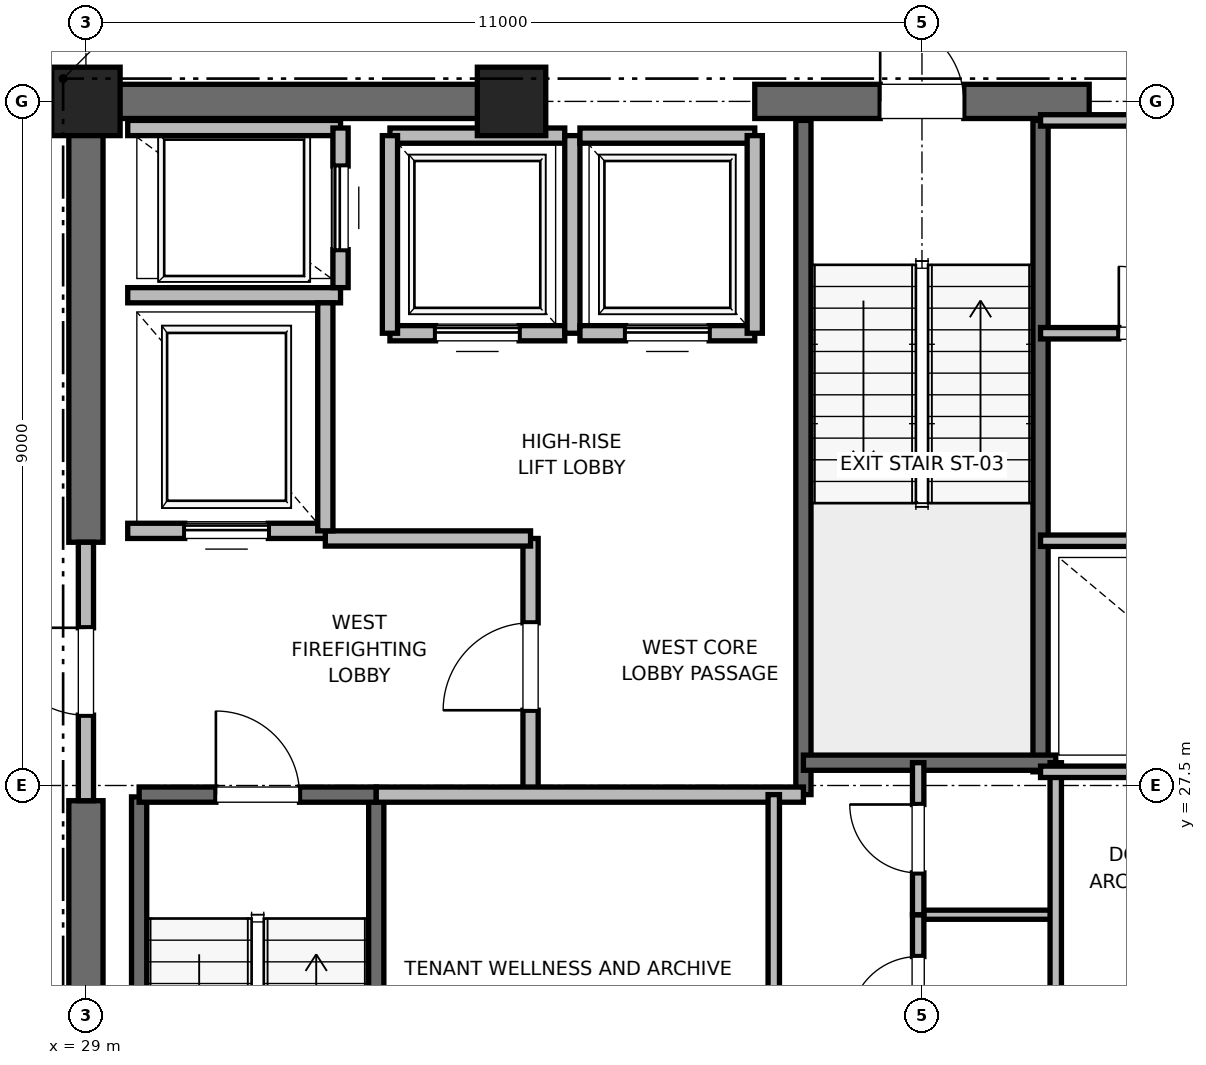
"""IFC4 building model, lengths in metres.
Left out: names, types, materials, properties, quantities, classifications, styles, units other than length and angle.
Written with IfcOpenShell. Run it as: python <this file> out.ifc"""

import sys

from ifc_helpers import new_model, si_unit, direction, frame, frame_2d, origin, origin_2d, place, context, subcontext, project, spatial, rectangle, extrude, element, fill, save


model = new_model("IFC4")
c1 = context("Model", 3, precision=1e-05, world=origin(), true_north=direction((0.0, 1.0)))
c2 = subcontext(c1, "Body", "Model", "MODEL_VIEW")
j1 = project(units=[si_unit("LENGTHUNIT", "METRE"), si_unit("PLANEANGLEUNIT", "RADIAN")], contexts=[c1])
p1 = place(None, origin())
s1 = spatial("IfcSite", under=j1, at=p1, CompositionType="ELEMENT")
p2 = place(p1, origin())
s2 = spatial("IfcBuilding", under=s1, at=p2, CompositionType="ELEMENT")
p3 = place(p2, frame((0.0, 0.0, 275.2)))
s3 = spatial("IfcBuildingStorey", under=s2, at=p3, CompositionType="ELEMENT", Elevation=275.2)
for number, where, z_axis, x_axis in (
    (1, (29.0, 36.5, 0.0), (0.0, 0.0, 1.0), (1.0, 0.0, 0.0)),
    (2, (34.6, 36.5, 0.0), (0.0, 0.0, 1.0), (1.0, 0.0, 0.0)),
):
    element("IfcColumn", number, at=place(p3, frame(where, z_axis=z_axis, x_axis=x_axis)), inside=s3, PredefinedType="PILASTER", context=c2, shape_type="SweptSolid", body=[
        extrude(rectangle(XDim=0.9, YDim=0.9, at=origin_2d()), origin(), (0.0, 0.0, 1.0), 4.0),
    ])
p4 = place(p3, frame((29.0, 36.5, 0.0), z_axis=(0.0, 0.0, 1.0), x_axis=(1.0, 0.0, 0.0)))
e3 = element("IfcWall", 3, at=p4, inside=s3, PredefinedType="SHEAR", context=c2, shape_type="SweptSolid", body=[
    extrude(rectangle(XDim=5.8, YDim=0.45, at=frame_2d((2.9, 0.0))), origin(), (0.0, 0.0, 1.0), 3.785),
])
p5 = place(p3, frame((37.8, 36.5, 0.0), z_axis=(0.0, 0.0, 1.0), x_axis=(1.0, 0.0, 0.0)))
e4 = element("IfcWall", 4, at=p5, inside=s3, PredefinedType="SHEAR", context=c2, shape_type="SweptSolid", body=[
    extrude(rectangle(XDim=4.4, YDim=0.45, at=frame_2d((2.2, 0.0))), origin(), (0.0, 0.0, 1.0), 3.785),
])
p6 = place(p5, frame((1.65, 0.0, 0.0)))
e5 = element("IfcOpeningElement", 5, at=p6, cuts=e4, PredefinedType="OPENING", context=c2, shape_type="SweptSolid", body=[
    extrude(rectangle(XDim=1.1, YDim=2.15, at=frame_2d((0.55, 1.075))), frame((0.0, 0.225, 0.0), z_axis=(0.0, -1.0, 0.0), x_axis=(1.0, 0.0, 0.0)), (0.0, 0.0, 1.0), 0.45),
])
p7 = place(p3, frame((29.0, 18.5, 0.0), z_axis=(0.0, 0.0, 1.0), x_axis=(0.0, 1.0, 0.0)))
e6 = element("IfcWall", 6, at=p7, inside=s3, PredefinedType="SHEAR", context=c2, shape_type="SweptSolid", body=[
    extrude(rectangle(XDim=8.8, YDim=0.45, at=frame_2d((4.4, 0.0))), origin(), (0.0, 0.0, 1.0), 3.785),
])
p8 = place(p3, frame((29.0, 30.7, 0.0), z_axis=(0.0, 0.0, 1.0), x_axis=(0.0, 1.0, 0.0)))
e7 = element("IfcWall", 7, at=p8, inside=s3, PredefinedType="SHEAR", context=c2, shape_type="SweptSolid", body=[
    extrude(rectangle(XDim=5.8, YDim=0.45, at=frame_2d((2.9, 0.0))), origin(), (0.0, 0.0, 1.0), 3.785),
])
p9 = place(p3, frame((29.7, 19.2, 0.0), z_axis=(0.0, 0.0, 1.0), x_axis=(0.0, 1.0, 0.0)))
e8 = element("IfcWall", 8, at=p9, inside=s3, PredefinedType="SOLIDWALL", context=c2, shape_type="SweptSolid", body=[
    extrude(rectangle(XDim=8.15, YDim=0.2, at=frame_2d((4.075, 0.0))), origin(), (0.0, 0.0, 1.0), 3.785),
])
p10 = place(p3, frame((32.82, 18.6, 0.0), z_axis=(0.0, 0.0, 1.0), x_axis=(0.0, 1.0, 0.0)))
e9 = element("IfcWall", 9, at=p10, inside=s3, PredefinedType="SOLIDWALL", context=c2, shape_type="SweptSolid", body=[
    extrude(rectangle(XDim=8.78, YDim=0.2, at=frame_2d((4.39, 0.0))), origin(), (0.0, 0.0, 1.0), 3.785),
])
p11 = place(p3, frame((29.7, 27.38, 0.0), z_axis=(0.0, 0.0, 1.0), x_axis=(1.0, 0.0, 0.0)))
e10 = element("IfcWall", 10, at=p11, inside=s3, PredefinedType="SOLIDWALL", context=c2, shape_type="SweptSolid", body=[
    extrude(rectangle(XDim=3.12, YDim=0.2, at=frame_2d((1.56, 0.0))), origin(), (0.0, 0.0, 1.0), 3.785),
])
p12 = place(p11, frame((1.01, 0.0, 0.0)))
e11 = element("IfcOpeningElement", 11, at=p12, cuts=e10, PredefinedType="OPENING", context=c2, shape_type="SweptSolid", body=[
    extrude(rectangle(XDim=1.1, YDim=2.15, at=frame_2d((0.55, 1.075))), frame((0.0, 0.1, 0.0), z_axis=(0.0, -1.0, 0.0), x_axis=(1.0, 0.0, 0.0)), (0.0, 0.0, 1.0), 0.2),
])
p13 = place(p3, frame((38.44, 27.38, 0.0), z_axis=(0.0, 0.0, 1.0), x_axis=(0.0, 1.0, 0.0)))
e12 = element("IfcWall", 12, at=p13, inside=s3, PredefinedType="SOLIDWALL", context=c2, shape_type="SweptSolid", body=[
    extrude(rectangle(XDim=8.87, YDim=0.2, at=frame_2d((4.435, 0.0))), origin(), (0.0, 0.0, 1.0), 3.785),
])
p14 = place(p3, frame((41.56, 27.68, 0.0), z_axis=(0.0, 0.0, 1.0), x_axis=(0.0, 1.0, 0.0)))
e13 = element("IfcWall", 13, at=p14, inside=s3, PredefinedType="SOLIDWALL", context=c2, shape_type="SweptSolid", body=[
    extrude(rectangle(XDim=8.57, YDim=0.2, at=frame_2d((4.285, 0.0))), origin(), (0.0, 0.0, 1.0), 3.785),
])
p15 = place(p3, frame((38.44, 27.8, 0.0), z_axis=(0.0, 0.0, 1.0), x_axis=(1.0, 0.0, 0.0)))
e14 = element("IfcWall", 14, at=p15, inside=s3, PredefinedType="SOLIDWALL", context=c2, shape_type="SweptSolid", body=[
    extrude(rectangle(XDim=3.32, YDim=0.2, at=frame_2d((1.66, 0.0))), origin(), (0.0, 0.0, 1.0), 3.785),
])
p16 = place(p3, frame((34.85, 27.38, 0.0), z_axis=(0.0, 0.0, 1.0), x_axis=(0.0, 1.0, 0.0)))
e15 = element("IfcWall", 15, at=p16, inside=s3, PredefinedType="PARTITIONING", context=c2, shape_type="SweptSolid", body=[
    extrude(rectangle(XDim=3.37, YDim=0.2, at=frame_2d((1.685, 0.0))), origin(), (0.0, 0.0, 1.0), 3.785),
])
p17 = place(p16, frame((1.11, 0.0, 0.0)))
e16 = element("IfcOpeningElement", 16, at=p17, cuts=e15, PredefinedType="OPENING", context=c2, shape_type="SweptSolid", body=[
    extrude(rectangle(XDim=1.15, YDim=2.2, at=frame_2d((0.575, 1.1))), frame((0.0, 0.1, 0.0), z_axis=(0.0, -1.0, 0.0), x_axis=(1.0, 0.0, 0.0)), (0.0, 0.0, 1.0), 0.2),
])
p18 = place(p3, frame((29.0, 27.3, 0.0), z_axis=(0.0, 0.0, 1.0), x_axis=(0.0, 1.0, 0.0)))
e17 = element("IfcWall", 17, at=p18, inside=s3, PredefinedType="PARTITIONING", context=c2, shape_type="SweptSolid", body=[
    extrude(rectangle(XDim=3.4, YDim=0.2, at=frame_2d((1.7, 0.0))), origin(), (0.0, 0.0, 1.0), 2.865),
])
p19 = place(p18, frame((1.125, 0.0, 0.0)))
e18 = element("IfcOpeningElement", 18, at=p19, cuts=e17, PredefinedType="OPENING", context=c2, shape_type="SweptSolid", body=[
    extrude(rectangle(XDim=1.15, YDim=2.2, at=frame_2d((0.575, 1.1))), frame((0.0, 0.1, 0.0), z_axis=(0.0, -1.0, 0.0), x_axis=(1.0, 0.0, 0.0)), (0.0, 0.0, 1.0), 0.2),
])
p20 = place(p3, frame((32.82, 27.38, 0.0), z_axis=(0.0, 0.0, 1.0), x_axis=(1.0, 0.0, 0.0)))
e19 = element("IfcWall", 19, at=p20, inside=s3, PredefinedType="PARTITIONING", context=c2, shape_type="SweptSolid", body=[
    extrude(rectangle(XDim=5.62, YDim=0.2, at=frame_2d((2.81, 0.0))), origin(), (0.0, 0.0, 1.0), 3.785),
])
p21 = place(p3, frame((32.15, 30.75, 0.0), z_axis=(0.0, 0.0, 1.0), x_axis=(1.0, 0.0, 0.0)))
e20 = element("IfcWall", 20, at=p21, inside=s3, PredefinedType="PARTITIONING", context=c2, shape_type="SweptSolid", body=[
    extrude(rectangle(XDim=2.7, YDim=0.2, at=frame_2d((1.35, 0.0))), origin(), (0.0, 0.0, 1.0), 3.785),
])
p22 = place(p3, frame((29.55, 30.85, 0.0), z_axis=(0.0, 0.0, 1.0), x_axis=(1.0, 0.0, 0.0)))
e21 = element("IfcWall", 21, at=p22, inside=s3, PredefinedType="SOLIDWALL", context=c2, shape_type="SweptSolid", body=[
    extrude(rectangle(XDim=2.6, YDim=0.2, at=frame_2d((1.3, 0.0))), origin(), (0.0, 0.0, 1.0), 2.865),
])
p23 = place(p22, frame((0.75, 0.0, 0.0)))
e22 = element("IfcOpeningElement", 22, at=p23, cuts=e21, PredefinedType="OPENING", context=c2, shape_type="SweptSolid", body=[
    extrude(rectangle(XDim=1.1, YDim=2.2, at=frame_2d((0.55, 1.1))), frame((0.0, 0.1, 0.0), z_axis=(0.0, -1.0, 0.0), x_axis=(1.0, 0.0, 0.0)), (0.0, 0.0, 1.0), 0.2),
])
p24 = place(p3, frame((29.55, 33.95, 0.0), z_axis=(0.0, 0.0, 1.0), x_axis=(1.0, 0.0, 0.0)))
e23 = element("IfcWall", 23, at=p24, inside=s3, PredefinedType="SOLIDWALL", context=c2, shape_type="SweptSolid", body=[
    extrude(rectangle(XDim=2.8, YDim=0.2, at=frame_2d((1.4, 0.0))), origin(), (0.0, 0.0, 1.0), 3.785),
])
p25 = place(p3, frame((32.15, 30.85, 0.0), z_axis=(0.0, 0.0, 1.0), x_axis=(0.0, 1.0, 0.0)))
e24 = element("IfcWall", 24, at=p25, inside=s3, PredefinedType="SOLIDWALL", context=c2, shape_type="SweptSolid", body=[
    extrude(rectangle(XDim=3.0, YDim=0.2, at=frame_2d((1.5, 0.0))), origin(), (0.0, 0.0, 1.0), 3.785),
])
p26 = place(p3, frame((32.35, 36.15, 0.0), z_axis=(0.0, 0.0, 1.0), x_axis=(-1.0, 0.0, 0.0)))
e25 = element("IfcWall", 25, at=p26, inside=s3, PredefinedType="SOLIDWALL", context=c2, shape_type="SweptSolid", body=[
    extrude(rectangle(XDim=2.8, YDim=0.2, at=frame_2d((1.4, 0.0))), origin(), (0.0, 0.0, 1.0), 3.148),
])
p27 = place(p3, frame((32.35, 34.05, 0.0), z_axis=(0.0, 0.0, 1.0), x_axis=(0.0, 1.0, 0.0)))
e26 = element("IfcWall", 26, at=p27, inside=s3, PredefinedType="SOLIDWALL", context=c2, shape_type="SweptSolid", body=[
    extrude(rectangle(XDim=2.1, YDim=0.2, at=frame_2d((1.05, 0.0))), origin(), (0.0, 0.0, 1.0), 3.785),
])
p28 = place(p27, frame((0.5, 0.0, 0.0)))
e27 = element("IfcOpeningElement", 27, at=p28, cuts=e26, PredefinedType="OPENING", context=c2, shape_type="SweptSolid", body=[
    extrude(rectangle(XDim=1.1, YDim=2.2, at=frame_2d((0.55, 1.1))), frame((0.0, 0.1, 0.0), z_axis=(0.0, -1.0, 0.0), x_axis=(1.0, 0.0, 0.0)), (0.0, 0.0, 1.0), 0.2),
])
p29 = place(p3, frame((33.0, 33.45, 0.0), z_axis=(0.0, 0.0, 1.0), x_axis=(1.0, 0.0, 0.0)))
e28 = element("IfcWall", 28, at=p29, inside=s3, PredefinedType="SOLIDWALL", context=c2, shape_type="SweptSolid", body=[
    extrude(rectangle(XDim=2.3, YDim=0.2, at=frame_2d((1.15, 0.0))), origin(), (0.0, 0.0, 1.0), 3.785),
])
p30 = place(p29, frame((0.6, 0.0, 0.0)))
e29 = element("IfcOpeningElement", 29, at=p30, cuts=e28, PredefinedType="OPENING", context=c2, shape_type="SweptSolid", body=[
    extrude(rectangle(XDim=1.1, YDim=2.2, at=frame_2d((0.55, 1.1))), frame((0.0, 0.1, 0.0), z_axis=(0.0, -1.0, 0.0), x_axis=(1.0, 0.0, 0.0)), (0.0, 0.0, 1.0), 0.2),
])
p31 = place(p3, frame((35.3, 36.05, 0.0), z_axis=(0.0, 0.0, 1.0), x_axis=(-1.0, 0.0, 0.0)))
e30 = element("IfcWall", 30, at=p31, inside=s3, PredefinedType="SOLIDWALL", context=c2, shape_type="SweptSolid", body=[
    extrude(rectangle(XDim=2.3, YDim=0.2, at=frame_2d((1.15, 0.0))), origin(), (0.0, 0.0, 1.0), 2.865),
])
p32 = place(p3, frame((33.0, 36.05, 0.0), z_axis=(0.0, 0.0, 1.0), x_axis=(0.0, -1.0, 0.0)))
e31 = element("IfcWall", 31, at=p32, inside=s3, PredefinedType="SOLIDWALL", context=c2, shape_type="SweptSolid", body=[
    extrude(rectangle(XDim=2.6, YDim=0.2, at=frame_2d((1.3, 0.0))), origin(), (0.0, 0.0, 1.0), 3.785),
])
p33 = place(p3, frame((35.4, 33.45, 0.0), z_axis=(0.0, 0.0, 1.0), x_axis=(0.0, 1.0, 0.0)))
e32 = element("IfcWall", 32, at=p33, inside=s3, PredefinedType="SOLIDWALL", context=c2, shape_type="SweptSolid", body=[
    extrude(rectangle(XDim=2.6, YDim=0.2, at=frame_2d((1.3, 0.0))), origin(), (0.0, 0.0, 1.0), 2.865),
])
p34 = place(p3, frame((35.5, 33.45, 0.0), z_axis=(0.0, 0.0, 1.0), x_axis=(1.0, 0.0, 0.0)))
e33 = element("IfcWall", 33, at=p34, inside=s3, PredefinedType="SOLIDWALL", context=c2, shape_type="SweptSolid", body=[
    extrude(rectangle(XDim=2.3, YDim=0.2, at=frame_2d((1.15, 0.0))), origin(), (0.0, 0.0, 1.0), 3.785),
])
p35 = place(p34, frame((0.6, 0.0, 0.0)))
e34 = element("IfcOpeningElement", 34, at=p35, cuts=e33, PredefinedType="OPENING", context=c2, shape_type="SweptSolid", body=[
    extrude(rectangle(XDim=1.1, YDim=2.2, at=frame_2d((0.55, 1.1))), frame((0.0, 0.1, 0.0), z_axis=(0.0, -1.0, 0.0), x_axis=(1.0, 0.0, 0.0)), (0.0, 0.0, 1.0), 0.2),
])
p36 = place(p3, frame((37.8, 36.05, 0.0), z_axis=(0.0, 0.0, 1.0), x_axis=(-1.0, 0.0, 0.0)))
e35 = element("IfcWall", 35, at=p36, inside=s3, PredefinedType="SOLIDWALL", context=c2, shape_type="SweptSolid", body=[
    extrude(rectangle(XDim=2.3, YDim=0.2, at=frame_2d((1.15, 0.0))), origin(), (0.0, 0.0, 1.0), 2.865),
])
p37 = place(p3, frame((37.8, 33.45, 0.0), z_axis=(0.0, 0.0, 1.0), x_axis=(0.0, 1.0, 0.0)))
e36 = element("IfcWall", 36, at=p37, inside=s3, PredefinedType="SOLIDWALL", context=c2, shape_type="SweptSolid", body=[
    extrude(rectangle(XDim=2.6, YDim=0.2, at=frame_2d((1.3, 0.0))), origin(), (0.0, 0.0, 1.0), 2.865),
])
p38 = place(p3, frame((39.95, 25.8, 0.0), z_axis=(0.0, 0.0, 1.0), x_axis=(1.0, 0.0, 0.0)))
e37 = element("IfcWall", 37, at=p38, inside=s3, PredefinedType="PARTITIONING", context=c2, shape_type="SweptSolid", body=[
    extrude(rectangle(XDim=1.81, YDim=0.12, at=frame_2d((0.905, 0.0))), origin(), (0.0, 0.0, 1.0), 2.85),
])
p39 = place(p3, frame((41.76, 23.8, 0.0), z_axis=(0.0, 0.0, 1.0), x_axis=(0.0, 1.0, 0.0)))
e38 = element("IfcWall", 38, at=p39, inside=s3, PredefinedType="PARTITIONING", context=c2, shape_type="SweptSolid", body=[
    extrude(rectangle(XDim=4.0, YDim=0.15, at=frame_2d((2.0, 0.0))), origin(), (0.0, 0.0, 1.0), 2.85),
])
p40 = place(p3, frame((39.95, 23.8, 0.0), z_axis=(0.0, 0.0, 1.0), x_axis=(0.0, 1.0, 0.0)))
e39 = element("IfcWall", 39, at=p40, inside=s3, PredefinedType="PARTITIONING", context=c2, shape_type="SweptSolid", body=[
    extrude(rectangle(XDim=2.0, YDim=0.15, at=frame_2d((1.0, 0.0))), origin(), (0.0, 0.0, 1.0), 2.85),
])
p41 = place(p40, frame((0.55, 0.0, 0.0)))
e40 = element("IfcOpeningElement", 40, at=p41, cuts=e39, PredefinedType="OPENING", context=c2, shape_type="SweptSolid", body=[
    extrude(rectangle(XDim=0.9, YDim=2.1, at=frame_2d((0.45, 1.05))), frame((0.0, 0.075, 0.0), z_axis=(0.0, -1.0, 0.0), x_axis=(1.0, 0.0, 0.0)), (0.0, 0.0, 1.0), 0.15),
])
p42 = place(p3, frame((39.95, 25.8, 0.0), z_axis=(0.0, 0.0, 1.0), x_axis=(0.0, 1.0, 0.0)))
e41 = element("IfcWall", 41, at=p42, inside=s3, PredefinedType="PARTITIONING", context=c2, shape_type="SweptSolid", body=[
    extrude(rectangle(XDim=2.0, YDim=0.15, at=frame_2d((1.0, 0.0))), origin(), (0.0, 0.0, 1.0), 2.85),
])
p43 = place(p42, frame((0.55, 0.0, 0.0)))
e42 = element("IfcOpeningElement", 42, at=p43, cuts=e41, PredefinedType="OPENING", context=c2, shape_type="SweptSolid", body=[
    extrude(rectangle(XDim=0.9, YDim=2.1, at=frame_2d((0.45, 1.05))), frame((0.0, 0.075, 0.0), z_axis=(0.0, -1.0, 0.0), x_axis=(1.0, 0.0, 0.0)), (0.0, 0.0, 1.0), 0.15),
])
p44 = place(p3, frame((38.05, 18.6, 0.0), z_axis=(0.0, 0.0, 1.0), x_axis=(0.0, 1.0, 0.0)))
e43 = element("IfcWall", 43, at=p44, inside=s3, PredefinedType="PARTITIONING", context=c2, shape_type="SweptSolid", body=[
    extrude(rectangle(XDim=8.78, YDim=0.15, at=frame_2d((4.39, 0.0))), origin(), (0.0, 0.0, 1.0), 2.85),
])
p45 = place(p44, frame((3.89, 0.0, 0.0)))
e44 = element("IfcOpeningElement", 44, at=p45, cuts=e43, PredefinedType="OPENING", context=c2, shape_type="SweptSolid", body=[
    extrude(rectangle(XDim=1.0, YDim=2.15, at=frame_2d((0.5, 1.075))), frame((0.0, 0.075, 0.0), z_axis=(0.0, -1.0, 0.0), x_axis=(1.0, 0.0, 0.0)), (0.0, 0.0, 1.0), 0.15),
])
p46 = place(p3, frame((41.56, 27.68, 0.0), z_axis=(0.0, 0.0, 1.0), x_axis=(1.0, 0.0, 0.0)))
e45 = element("IfcWall", 45, at=p46, inside=s3, PredefinedType="PARTITIONING", context=c2, shape_type="SweptSolid", body=[
    extrude(rectangle(XDim=3.59, YDim=0.15, at=frame_2d((1.795, 0.0))), origin(), (0.0, 0.0, 1.0), 2.85),
])
p47 = place(p3, frame((41.56, 30.72, 0.0), z_axis=(0.0, 0.0, 1.0), x_axis=(1.0, 0.0, 0.0)))
e46 = element("IfcWall", 46, at=p47, inside=s3, PredefinedType="PARTITIONING", context=c2, shape_type="SweptSolid", body=[
    extrude(rectangle(XDim=3.59, YDim=0.15, at=frame_2d((1.795, 0.0))), origin(), (0.0, 0.0, 1.0), 2.85),
])
p48 = place(p47, frame((1.355, 0.0, 0.0)))
e47 = element("IfcOpeningElement", 47, at=p48, cuts=e46, PredefinedType="OPENING", context=c2, shape_type="SweptSolid", body=[
    extrude(rectangle(XDim=0.88, YDim=2.1, at=frame_2d((0.44, 1.05))), frame((0.0, 0.075, 0.0), z_axis=(0.0, -1.0, 0.0), x_axis=(1.0, 0.0, 0.0)), (0.0, 0.0, 1.0), 0.15),
])
p49 = place(p3, frame((41.56, 36.25, 0.0), z_axis=(0.0, 0.0, 1.0), x_axis=(1.0, 0.0, 0.0)))
e48 = element("IfcWall", 48, at=p49, inside=s3, PredefinedType="PARTITIONING", context=c2, shape_type="SweptSolid", body=[
    extrude(rectangle(XDim=2.94, YDim=0.15, at=frame_2d((1.47, 0.0))), origin(), (0.0, 0.0, 1.0), 2.85),
])
p50 = place(p3, frame((41.56, 33.45, 0.0), z_axis=(0.0, 0.0, 1.0), x_axis=(1.0, 0.0, 0.0)))
e49 = element("IfcWall", 49, at=p50, inside=s3, PredefinedType="PARTITIONING", context=c2, shape_type="SweptSolid", body=[
    extrude(rectangle(XDim=2.94, YDim=0.15, at=frame_2d((1.47, 0.0))), origin(), (0.0, 0.0, 1.0), 2.85),
])
p51 = place(p50, frame((1.03, 0.0, 0.0)))
e50 = element("IfcOpeningElement", 50, at=p51, cuts=e49, PredefinedType="OPENING", context=c2, shape_type="SweptSolid", body=[
    extrude(rectangle(XDim=0.88, YDim=2.1, at=frame_2d((0.44, 1.05))), frame((0.0, 0.075, 0.0), z_axis=(0.0, -1.0, 0.0), x_axis=(1.0, 0.0, 0.0)), (0.0, 0.0, 1.0), 0.15),
])
p52 = place(p12, origin())
e51 = element("IfcDoor", 51, at=p52, inside=s3, OperationType="SINGLE_SWING_LEFT", PredefinedType="DOOR", context=c2, shape_type="SweptSolid", body=[
    extrude(rectangle(XDim=1.1, YDim=2.15, at=frame_2d((0.55, 1.075))), frame((0.0, 0.025, 0.0), z_axis=(0.0, -1.0, 0.0), x_axis=(1.0, 0.0, 0.0)), (0.0, 0.0, 1.0), 0.05),
])
fill(e11, e51)
p53 = place(p6, origin())
e52 = element("IfcDoor", 52, at=p53, inside=s3, OperationType="SINGLE_SWING_LEFT", PredefinedType="DOOR", context=c2, shape_type="SweptSolid", body=[
    extrude(rectangle(XDim=1.1, YDim=2.15, at=frame_2d((0.55, 1.075))), frame((0.0, 0.025, 0.0), z_axis=(0.0, -1.0, 0.0), x_axis=(1.0, 0.0, 0.0)), (0.0, 0.0, 1.0), 0.05),
])
fill(e5, e52)
p54 = place(p17, origin())
e53 = element("IfcDoor", 53, at=p54, inside=s3, OperationType="SINGLE_SWING_LEFT", PredefinedType="DOOR", context=c2, shape_type="SweptSolid", body=[
    extrude(rectangle(XDim=1.15, YDim=2.2, at=frame_2d((0.575, 1.1))), frame((0.0, 0.025, 0.0), z_axis=(0.0, -1.0, 0.0), x_axis=(1.0, 0.0, 0.0)), (0.0, 0.0, 1.0), 0.05),
])
fill(e16, e53)
p55 = place(p19, origin())
e54 = element("IfcDoor", 54, at=p55, inside=s3, OperationType="SINGLE_SWING_RIGHT", PredefinedType="DOOR", context=c2, shape_type="SweptSolid", body=[
    extrude(rectangle(XDim=1.15, YDim=2.2, at=frame_2d((0.575, 1.1))), frame((0.0, 0.025, 0.0), z_axis=(0.0, -1.0, 0.0), x_axis=(1.0, 0.0, 0.0)), (0.0, 0.0, 1.0), 0.05),
])
fill(e18, e54)
p56 = place(p23, origin())
e55 = element("IfcDoor", 55, at=p56, inside=s3, OperationType="SLIDING_TO_RIGHT", PredefinedType="DOOR", context=c2, shape_type="SweptSolid", body=[
    extrude(rectangle(XDim=1.1, YDim=2.2, at=frame_2d((0.55, 1.1))), frame((0.0, 0.025, 0.0), z_axis=(0.0, -1.0, 0.0), x_axis=(1.0, 0.0, 0.0)), (0.0, 0.0, 1.0), 0.05),
])
fill(e22, e55)
p57 = place(p28, origin())
e56 = element("IfcDoor", 56, at=p57, inside=s3, OperationType="SLIDING_TO_RIGHT", PredefinedType="DOOR", context=c2, shape_type="SweptSolid", body=[
    extrude(rectangle(XDim=1.1, YDim=2.2, at=frame_2d((0.55, 1.1))), frame((0.0, 0.025, 0.0), z_axis=(0.0, -1.0, 0.0), x_axis=(1.0, 0.0, 0.0)), (0.0, 0.0, 1.0), 0.05),
])
fill(e27, e56)
p58 = place(p30, origin())
e57 = element("IfcDoor", 57, at=p58, inside=s3, OperationType="SLIDING_TO_RIGHT", PredefinedType="DOOR", context=c2, shape_type="SweptSolid", body=[
    extrude(rectangle(XDim=1.1, YDim=2.2, at=frame_2d((0.55, 1.1))), frame((0.0, 0.025, 0.0), z_axis=(0.0, -1.0, 0.0), x_axis=(1.0, 0.0, 0.0)), (0.0, 0.0, 1.0), 0.05),
])
fill(e29, e57)
p59 = place(p35, origin())
e58 = element("IfcDoor", 58, at=p59, inside=s3, OperationType="SLIDING_TO_RIGHT", PredefinedType="DOOR", context=c2, shape_type="SweptSolid", body=[
    extrude(rectangle(XDim=1.1, YDim=2.2, at=frame_2d((0.55, 1.1))), frame((0.0, 0.025, 0.0), z_axis=(0.0, -1.0, 0.0), x_axis=(1.0, 0.0, 0.0)), (0.0, 0.0, 1.0), 0.05),
])
fill(e34, e58)
p60 = place(p41, origin())
e59 = element("IfcDoor", 59, at=p60, inside=s3, OperationType="SINGLE_SWING_LEFT", PredefinedType="DOOR", context=c2, shape_type="SweptSolid", body=[
    extrude(rectangle(XDim=0.9, YDim=2.1, at=frame_2d((0.45, 1.05))), frame((0.0, 0.025, 0.0), z_axis=(0.0, -1.0, 0.0), x_axis=(1.0, 0.0, 0.0)), (0.0, 0.0, 1.0), 0.05),
])
fill(e40, e59)
p61 = place(p43, origin())
e60 = element("IfcDoor", 60, at=p61, inside=s3, OperationType="SINGLE_SWING_RIGHT", PredefinedType="DOOR", context=c2, shape_type="SweptSolid", body=[
    extrude(rectangle(XDim=0.9, YDim=2.1, at=frame_2d((0.45, 1.05))), frame((0.0, 0.025, 0.0), z_axis=(0.0, -1.0, 0.0), x_axis=(1.0, 0.0, 0.0)), (0.0, 0.0, 1.0), 0.05),
])
fill(e42, e60)
p62 = place(p51, origin())
e61 = element("IfcDoor", 61, at=p62, inside=s3, OperationType="SINGLE_SWING_LEFT", PredefinedType="DOOR", context=c2, shape_type="SweptSolid", body=[
    extrude(rectangle(XDim=0.88, YDim=2.1, at=frame_2d((0.44, 1.05))), frame((0.0, 0.025, 0.0), z_axis=(0.0, -1.0, 0.0), x_axis=(1.0, 0.0, 0.0)), (0.0, 0.0, 1.0), 0.05),
])
fill(e50, e61)
save(model, sys.argv[1])
